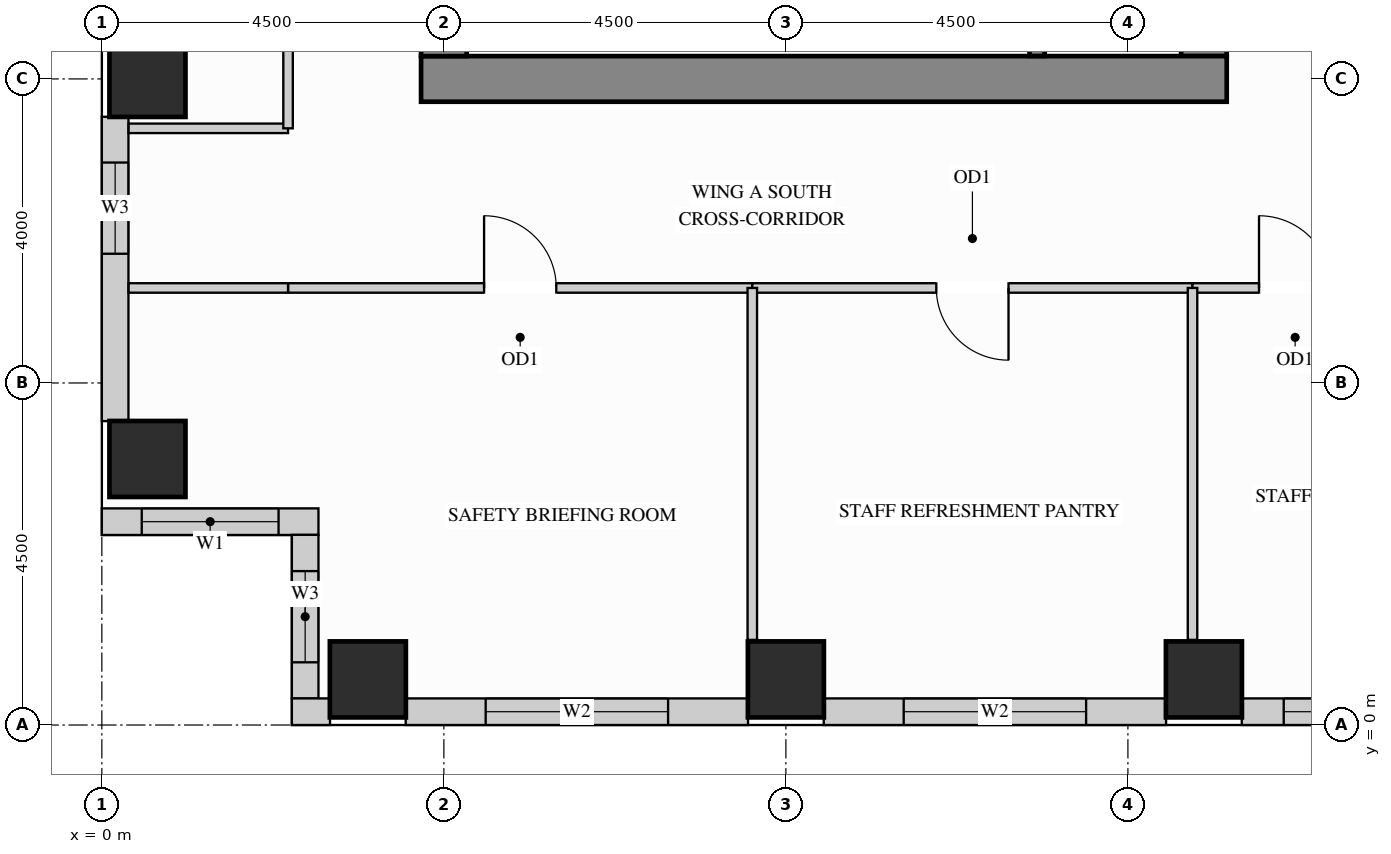
"""IFC4 building model, lengths in metres.
Left out: names, types, materials, properties, quantities, classifications, styles, units other than length and angle.
Written with IfcOpenShell. Run it as: python <this file> out.ifc"""

import sys

from ifc_helpers import new_model, si_unit, direction, frame, frame_2d, origin, origin_2d, place, context, subcontext, project, spatial, rectangle, extrude, source, transform, mapped, element, fill, save


model = new_model("IFC4")
c1 = context("Model", 3, precision=1e-05, world=origin(), true_north=direction((0.0, 1.0)))
c2 = subcontext(c1, "Body", "Model", "MODEL_VIEW")
j1 = project(units=[si_unit("LENGTHUNIT", "METRE"), si_unit("PLANEANGLEUNIT", "RADIAN")], contexts=[c1])
p1 = place(None, origin())
s1 = spatial("IfcSite", under=j1, at=p1, CompositionType="ELEMENT")
p2 = place(p1, origin())
s2 = spatial("IfcBuilding", under=s1, at=p2, CompositionType="ELEMENT")
p3 = place(p2, frame((0.0, 0.0, 182.7)))
s3 = spatial("IfcBuildingStorey", under=s2, at=p3, CompositionType="ELEMENT", Elevation=182.7)
m1 = source(origin(), c2, "Body", "SweptSolid", [
    extrude(rectangle(XDim=1.0, YDim=1.0, at=origin_2d()), origin(), (0.0, 0.0, 1.0), 3.4),
])
for number, where, z_axis, x_axis in (
    (1, (14.5, 0.6, 0.0), (0.0, 0.0, 1.0), (1.0, 0.0, 0.0)),
    (2, (3.5, 0.6, 0.0), (0.0, 0.0, 1.0), (1.0, 0.0, 0.0)),
    (3, (9.0, 0.6, 0.0), (0.0, 0.0, 1.0), (1.0, 0.0, 0.0)),
    (4, (0.6, 3.5, 0.0), (0.0, 0.0, 1.0), (1.0, 0.0, 0.0)),
    (5, (0.6, 8.5, 0.0), (0.0, 0.0, 1.0), (1.0, 0.0, 0.0)),
):
    element("IfcColumn", number, at=place(p3, frame(where, z_axis=z_axis, x_axis=x_axis)), inside=s3, PredefinedType="COLUMN", context=c2, shape_type="MappedRepresentation", body=[
        mapped(m1, transform((0.0, 0.0, 0.0), x_axis=(1.0, 0.0, 0.0), y_axis=(0.0, 1.0, 0.0), z_axis=(0.0, 0.0, 1.0))),
    ])
m2 = source(origin(), c2, "Body", "SweptSolid", [
    extrude(rectangle(XDim=10.02, YDim=0.6, at=frame_2d((5.01, 0.0))), origin(), (0.0, 0.0, 1.0), 3.4),
])
p4 = place(p3, frame((14.5, 8.8, 0.0), z_axis=(0.0, 0.0, 1.0), x_axis=(0.0, 1.0, 0.0)))
e6 = element("IfcWall", 6, at=p4, inside=s3, PredefinedType="SHEAR", context=c2, shape_type="MappedRepresentation", body=[
    mapped(m2, transform((0.0, 0.0, 0.0), x_axis=(1.0, 0.0, 0.0), y_axis=(0.0, 1.0, 0.0), z_axis=(0.0, 0.0, 1.0))),
])
m3 = source(origin(), c2, "Body", "SweptSolid", [
    extrude(rectangle(XDim=10.6, YDim=0.6, at=frame_2d((5.3, 0.0))), origin(), (0.0, 0.0, 1.0), 3.4),
])
p5 = place(p3, frame((4.2, 8.5, 0.0), z_axis=(0.0, 0.0, 1.0), x_axis=(1.0, 0.0, 0.0)))
e7 = element("IfcWall", 7, at=p5, inside=s3, PredefinedType="SHEAR", context=c2, shape_type="MappedRepresentation", body=[
    mapped(m3, transform((0.0, 0.0, 0.0), x_axis=(1.0, 0.0, 0.0), y_axis=(0.0, 1.0, 0.0), z_axis=(0.0, 0.0, 1.0))),
])
m4 = source(origin(), c2, "Body", "SweptSolid", [
    extrude(rectangle(XDim=20.4, YDim=0.6, at=frame_2d((10.2, 0.0))), origin(), (0.0, 0.0, 1.0), 3.4),
])
p6 = place(p3, frame((4.5, 8.8, 0.0), z_axis=(0.0, 0.0, 1.0), x_axis=(0.0, 1.0, 0.0)))
e8 = element("IfcWall", 8, at=p6, inside=s3, PredefinedType="SHEAR", context=c2, shape_type="MappedRepresentation", body=[
    mapped(m4, transform((0.0, 0.0, 0.0), x_axis=(1.0, 0.0, 0.0), y_axis=(0.0, 1.0, 0.0), z_axis=(0.0, 0.0, 1.0))),
])
p7 = place(p3, frame((0.175, 8.002, 0.0), z_axis=(0.0, 0.0, 1.0), x_axis=(0.0, -1.0, 0.0)))
e9 = element("IfcWall", 9, at=p7, inside=s3, PredefinedType="SOLIDWALL", context=c2, shape_type="SweptSolid", body=[
    extrude(rectangle(XDim=4.004, YDim=0.35, at=frame_2d((2.002, 0.0))), origin(), (0.0, 0.0, 1.0), 2.612),
])
p8 = place(p7, frame((0.602, 0.0, 0.78)))
e10 = element("IfcOpeningElement", 10, at=p8, cuts=e9, PredefinedType="OPENING", context=c2, shape_type="SweptSolid", body=[
    extrude(rectangle(XDim=1.2, YDim=1.652, at=frame_2d((0.6, 0.826))), frame((0.0, 0.185, 0.0), z_axis=(0.0, -1.0, 0.0), x_axis=(1.0, 0.0, 0.0)), (0.0, 0.0, 1.0), 0.37),
])
p9 = place(p3, frame((0.0, 2.675, 0.0), z_axis=(0.0, 0.0, 1.0), x_axis=(1.0, 0.0, 0.0)))
e11 = element("IfcWall", 11, at=p9, inside=s3, PredefinedType="SOLIDWALL", context=c2, shape_type="SweptSolid", body=[
    extrude(rectangle(XDim=2.85, YDim=0.35, at=frame_2d((1.425, 0.0))), origin(), (0.0, 0.0, 1.0), 3.385),
])
p10 = place(p9, frame((0.525, 0.0, 0.78)))
e12 = element("IfcOpeningElement", 12, at=p10, cuts=e11, PredefinedType="OPENING", context=c2, shape_type="SweptSolid", body=[
    extrude(rectangle(XDim=1.8, YDim=2.1, at=frame_2d((0.9, 1.05))), frame((0.0, 0.185, 0.0), z_axis=(0.0, -1.0, 0.0), x_axis=(1.0, 0.0, 0.0)), (0.0, 0.0, 1.0), 0.37),
])
p11 = place(p3, frame((2.675, 2.502, 0.0), z_axis=(0.0, 0.0, 1.0), x_axis=(0.0, -1.0, 0.0)))
e13 = element("IfcWall", 13, at=p11, inside=s3, PredefinedType="SOLIDWALL", context=c2, shape_type="SweptSolid", body=[
    extrude(rectangle(XDim=2.154, YDim=0.35, at=frame_2d((1.077, 0.0))), origin(), (0.0, 0.0, 1.0), 3.385),
])
p12 = place(p11, frame((0.477, 0.0, 0.78)))
e14 = element("IfcOpeningElement", 14, at=p12, cuts=e13, PredefinedType="OPENING", context=c2, shape_type="SweptSolid", body=[
    extrude(rectangle(XDim=1.2, YDim=2.1, at=frame_2d((0.6, 1.05))), frame((0.0, 0.185, 0.0), z_axis=(0.0, -1.0, 0.0), x_axis=(1.0, 0.0, 0.0)), (0.0, 0.0, 1.0), 0.37),
])
m5 = source(origin(), c2, "Body", "SweptSolid", [
    extrude(rectangle(XDim=0.502, YDim=0.35, at=frame_2d((0.251, 0.0))), origin(), (0.0, 0.0, 1.0), 3.385),
])
p13 = place(p3, frame((2.5, 0.175, 0.0), z_axis=(0.0, 0.0, 1.0), x_axis=(1.0, 0.0, 0.0)))
e15 = element("IfcWall", 15, at=p13, inside=s3, PredefinedType="SOLIDWALL", context=c2, shape_type="MappedRepresentation", body=[
    mapped(m5, transform((0.0, 0.0, 0.0), x_axis=(1.0, 0.0, 0.0), y_axis=(0.0, 1.0, 0.0), z_axis=(0.0, 0.0, 1.0))),
])
p14 = place(p3, frame((3.998, 0.175, 0.0), z_axis=(0.0, 0.0, 1.0), x_axis=(1.0, 0.0, 0.0)))
e16 = element("IfcWall", 16, at=p14, inside=s3, PredefinedType="SOLIDWALL", context=c2, shape_type="SweptSolid", body=[
    extrude(rectangle(XDim=4.504, YDim=0.35, at=frame_2d((2.252, 0.0))), origin(), (0.0, 0.0, 1.0), 2.612),
])
p15 = place(p14, frame((1.052, 0.0, 0.78)))
e17 = element("IfcOpeningElement", 17, at=p15, cuts=e16, PredefinedType="OPENING", context=c2, shape_type="SweptSolid", body=[
    extrude(rectangle(XDim=2.4, YDim=1.652, at=frame_2d((1.2, 0.826))), frame((0.0, 0.185, 0.0), z_axis=(0.0, -1.0, 0.0), x_axis=(1.0, 0.0, 0.0)), (0.0, 0.0, 1.0), 0.37),
])
p16 = place(p3, frame((9.498, 0.175, 0.0), z_axis=(0.0, 0.0, 1.0), x_axis=(1.0, 0.0, 0.0)))
e18 = element("IfcWall", 18, at=p16, inside=s3, PredefinedType="SOLIDWALL", context=c2, shape_type="SweptSolid", body=[
    extrude(rectangle(XDim=4.504, YDim=0.35, at=frame_2d((2.252, 0.0))), origin(), (0.0, 0.0, 1.0), 2.612),
])
p17 = place(p16, frame((1.052, 0.0, 0.78)))
e19 = element("IfcOpeningElement", 19, at=p17, cuts=e18, PredefinedType="OPENING", context=c2, shape_type="SweptSolid", body=[
    extrude(rectangle(XDim=2.4, YDim=1.652, at=frame_2d((1.2, 0.826))), frame((0.0, 0.185, 0.0), z_axis=(0.0, -1.0, 0.0), x_axis=(1.0, 0.0, 0.0)), (0.0, 0.0, 1.0), 0.37),
])
p18 = place(p3, frame((14.998, 0.175, 0.0), z_axis=(0.0, 0.0, 1.0), x_axis=(1.0, 0.0, 0.0)))
e20 = element("IfcWall", 20, at=p18, inside=s3, PredefinedType="SOLIDWALL", context=c2, shape_type="SweptSolid", body=[
    extrude(rectangle(XDim=3.504, YDim=0.35, at=frame_2d((1.752, 0.0))), origin(), (0.0, 0.0, 1.0), 2.612),
])
p19 = place(p18, frame((0.552, 0.0, 0.78)))
e21 = element("IfcOpeningElement", 21, at=p19, cuts=e20, PredefinedType="OPENING", context=c2, shape_type="SweptSolid", body=[
    extrude(rectangle(XDim=2.4, YDim=1.652, at=frame_2d((1.2, 0.826))), frame((0.0, 0.185, 0.0), z_axis=(0.0, -1.0, 0.0), x_axis=(1.0, 0.0, 0.0)), (0.0, 0.0, 1.0), 0.37),
])
m6 = source(origin(), c2, "Body", "SweptSolid", [
    extrude(rectangle(XDim=2.098, YDim=0.125, at=frame_2d((1.049, 0.0))), origin(), (0.0, 0.0, 1.0), 3.385),
])
p20 = place(p3, frame((0.352, 7.85, 0.0), z_axis=(0.0, 0.0, 1.0), x_axis=(1.0, 0.0, 0.0)))
e22 = element("IfcWall", 22, at=p20, inside=s3, PredefinedType="PARTITIONING", context=c2, shape_type="MappedRepresentation", body=[
    mapped(m6, transform((0.0, 0.0, 0.0), x_axis=(1.0, 0.0, 0.0), y_axis=(0.0, 1.0, 0.0), z_axis=(0.0, 0.0, 1.0))),
])
p21 = place(p3, frame((2.45, 5.75, 0.0), z_axis=(0.0, 0.0, 1.0), x_axis=(1.0, 0.0, 0.0)))
e23 = element("IfcWall", 23, at=p21, inside=s3, PredefinedType="PARTITIONING", context=c2, shape_type="SweptSolid", body=[
    extrude(rectangle(XDim=6.108, YDim=0.125, at=frame_2d((3.054, 0.0))), origin(), (0.0, 0.0, 1.0), 3.385),
])
p22 = place(p21, frame((2.579, 0.0, 0.0)))
e24 = element("IfcOpeningElement", 24, at=p22, cuts=e23, PredefinedType="OPENING", context=c2, shape_type="SweptSolid", body=[
    extrude(rectangle(XDim=0.95, YDim=2.15, at=frame_2d((0.475, 1.075))), frame((0.0, 0.073, 0.0), z_axis=(0.0, -1.0, 0.0), x_axis=(1.0, 0.0, 0.0)), (0.0, 0.0, 1.0), 0.145),
])
p23 = place(p3, frame((8.558, 5.75, 0.0), z_axis=(0.0, 0.0, 1.0), x_axis=(1.0, 0.0, 0.0)))
e25 = element("IfcWall", 25, at=p23, inside=s3, PredefinedType="PARTITIONING", context=c2, shape_type="SweptSolid", body=[
    extrude(rectangle(XDim=5.792, YDim=0.125, at=frame_2d((2.896, 0.0))), origin(), (0.0, 0.0, 1.0), 3.385),
])
p24 = place(p23, frame((2.421, 0.0, 0.0)))
e26 = element("IfcOpeningElement", 26, at=p24, cuts=e25, PredefinedType="OPENING", context=c2, shape_type="SweptSolid", body=[
    extrude(rectangle(XDim=0.95, YDim=2.15, at=frame_2d((0.475, 1.075))), frame((0.0, 0.073, 0.0), z_axis=(0.0, -1.0, 0.0), x_axis=(1.0, 0.0, 0.0)), (0.0, 0.0, 1.0), 0.145),
])
p25 = place(p3, frame((14.35, 5.75, 0.0), z_axis=(0.0, 0.0, 1.0), x_axis=(1.0, 0.0, 0.0)))
e27 = element("IfcWall", 27, at=p25, inside=s3, PredefinedType="PARTITIONING", context=c2, shape_type="SweptSolid", body=[
    extrude(rectangle(XDim=2.7, YDim=0.125, at=frame_2d((1.35, 0.0))), origin(), (0.0, 0.0, 1.0), 3.385),
])
p26 = place(p25, frame((0.875, 0.0, 0.0)))
e28 = element("IfcOpeningElement", 28, at=p26, cuts=e27, PredefinedType="OPENING", context=c2, shape_type="SweptSolid", body=[
    extrude(rectangle(XDim=0.95, YDim=2.15, at=frame_2d((0.475, 1.075))), frame((0.0, 0.073, 0.0), z_axis=(0.0, -1.0, 0.0), x_axis=(1.0, 0.0, 0.0)), (0.0, 0.0, 1.0), 0.145),
])
p27 = place(p3, frame((0.352, 5.75, 0.0), z_axis=(0.0, 0.0, 1.0), x_axis=(1.0, 0.0, 0.0)))
e29 = element("IfcWall", 29, at=p27, inside=s3, PredefinedType="PARTITIONING", context=c2, shape_type="MappedRepresentation", body=[
    mapped(m6, transform((0.0, 0.0, 0.0), x_axis=(1.0, 0.0, 0.0), y_axis=(0.0, 1.0, 0.0), z_axis=(0.0, 0.0, 1.0))),
])
m7 = source(origin(), c2, "Body", "SweptSolid", [
    extrude(rectangle(XDim=4.63, YDim=0.125, at=frame_2d((2.315, 0.0))), origin(), (0.0, 0.0, 1.0), 3.385),
])
for number, where, z_axis, x_axis in (
    (30, (8.558, 1.12, 0.0), (0.0, 0.0, 1.0), (0.0, 1.0, 0.0)),
    (31, (14.35, 1.12, 0.0), (0.0, 0.0, 1.0), (0.0, 1.0, 0.0)),
):
    element("IfcWall", number, at=place(p3, frame(where, z_axis=z_axis, x_axis=x_axis)), inside=s3, PredefinedType="PARTITIONING", context=c2, shape_type="MappedRepresentation", body=[
        mapped(m7, transform((0.0, 0.0, 0.0), x_axis=(1.0, 0.0, 0.0), y_axis=(0.0, 1.0, 0.0), z_axis=(0.0, 0.0, 1.0))),
    ])
p28 = place(p3, frame((2.45, 7.85, 0.0), z_axis=(0.0, 0.0, 1.0), x_axis=(0.0, 1.0, 0.0)))
e32 = element("IfcWall", 32, at=p28, inside=s3, PredefinedType="PARTITIONING", context=c2, shape_type="SweptSolid", body=[
    extrude(rectangle(XDim=7.25, YDim=0.125, at=frame_2d((3.625, 0.0))), origin(), (0.0, 0.0, 1.0), 3.385),
])
p29 = place(p28, frame((3.15, 0.0, 0.0)))
e33 = element("IfcOpeningElement", 33, at=p29, cuts=e32, PredefinedType="OPENING", context=c2, shape_type="SweptSolid", body=[
    extrude(rectangle(XDim=0.95, YDim=2.15, at=frame_2d((0.475, 1.075))), frame((0.0, 0.073, 0.0), z_axis=(0.0, -1.0, 0.0), x_axis=(1.0, 0.0, 0.0)), (0.0, 0.0, 1.0), 0.145),
])
m8 = source(origin(), c2, "Body", "SweptSolid", [
    extrude(rectangle(XDim=3.753, YDim=0.2, at=frame_2d((1.876, 0.0))), origin(), (0.0, 0.0, 1.0), 3.4),
])
p30 = place(p3, frame((12.305, 8.802, 0.0), z_axis=(0.0, 0.0, 1.0), x_axis=(0.0, 1.0, 0.0)))
e34 = element("IfcWall", 34, at=p30, inside=s3, PredefinedType="SHEAR", context=c2, shape_type="MappedRepresentation", body=[
    mapped(m8, transform((0.0, 0.0, 0.0), x_axis=(1.0, 0.0, 0.0), y_axis=(0.0, 1.0, 0.0), z_axis=(0.0, 0.0, 1.0))),
])
m9 = source(origin(), c2, "Body", "SweptSolid", [
    extrude(rectangle(XDim=0.95, YDim=2.15, at=frame_2d((0.475, 1.075))), frame((0.0, 0.025, 0.0), z_axis=(0.0, -1.0, 0.0), x_axis=(1.0, 0.0, 0.0)), (0.0, 0.0, 1.0), 0.05),
])
p31 = place(p22, origin())
e35 = element("IfcDoor", 35, at=p31, inside=s3, OperationType="SINGLE_SWING_LEFT", PredefinedType="DOOR", context=c2, shape_type="MappedRepresentation", body=[
    mapped(m9, transform((0.0, 0.0, 0.0), x_axis=(1.0, 0.0, 0.0), y_axis=(0.0, 1.0, 0.0), z_axis=(0.0, 0.0, 1.0))),
])
fill(e24, e35)
p32 = place(p24, origin())
e36 = element("IfcDoor", 36, at=p32, inside=s3, OperationType="SINGLE_SWING_RIGHT", PredefinedType="DOOR", context=c2, shape_type="MappedRepresentation", body=[
    mapped(m9, transform((0.0, 0.0, 0.0), x_axis=(1.0, 0.0, 0.0), y_axis=(0.0, 1.0, 0.0), z_axis=(0.0, 0.0, 1.0))),
])
fill(e26, e36)
p33 = place(p26, origin())
e37 = element("IfcDoor", 37, at=p33, inside=s3, OperationType="SINGLE_SWING_LEFT", PredefinedType="DOOR", context=c2, shape_type="MappedRepresentation", body=[
    mapped(m9, transform((0.0, 0.0, 0.0), x_axis=(1.0, 0.0, 0.0), y_axis=(0.0, 1.0, 0.0), z_axis=(0.0, 0.0, 1.0))),
])
fill(e28, e37)
m10 = source(origin(), c2, "Body", "SweptSolid", [
    extrude(rectangle(XDim=1.8, YDim=2.1, at=frame_2d((0.9, 1.05))), frame((0.0, 0.03, 0.0), z_axis=(0.0, -1.0, 0.0), x_axis=(1.0, 0.0, 0.0)), (0.0, 0.0, 1.0), 0.06),
])
p34 = place(p10, origin())
e38 = element("IfcWindow", 38, at=p34, inside=s3, PartitioningType="SINGLE_PANEL", PredefinedType="WINDOW", context=c2, shape_type="MappedRepresentation", body=[
    mapped(m10, transform((0.0, 0.0, 0.0), x_axis=(1.0, 0.0, 0.0), y_axis=(0.0, 1.0, 0.0), z_axis=(0.0, 0.0, 1.0))),
])
fill(e12, e38)
m11 = source(origin(), c2, "Body", "SweptSolid", [
    extrude(rectangle(XDim=2.4, YDim=1.652, at=frame_2d((1.2, 0.826))), frame((0.0, 0.03, 0.0), z_axis=(0.0, -1.0, 0.0), x_axis=(1.0, 0.0, 0.0)), (0.0, 0.0, 1.0), 0.06),
])
p35 = place(p15, origin())
e39 = element("IfcWindow", 39, at=p35, inside=s3, PartitioningType="SINGLE_PANEL", PredefinedType="WINDOW", context=c2, shape_type="MappedRepresentation", body=[
    mapped(m11, transform((0.0, 0.0, 0.0), x_axis=(1.0, 0.0, 0.0), y_axis=(0.0, 1.0, 0.0), z_axis=(0.0, 0.0, 1.0))),
])
fill(e17, e39)
p36 = place(p17, origin())
e40 = element("IfcWindow", 40, at=p36, inside=s3, PartitioningType="SINGLE_PANEL", PredefinedType="WINDOW", context=c2, shape_type="MappedRepresentation", body=[
    mapped(m11, transform((0.0, 0.0, 0.0), x_axis=(1.0, 0.0, 0.0), y_axis=(0.0, 1.0, 0.0), z_axis=(0.0, 0.0, 1.0))),
])
fill(e19, e40)
p37 = place(p19, origin())
e41 = element("IfcWindow", 41, at=p37, inside=s3, PartitioningType="SINGLE_PANEL", PredefinedType="WINDOW", context=c2, shape_type="MappedRepresentation", body=[
    mapped(m11, transform((0.0, 0.0, 0.0), x_axis=(1.0, 0.0, 0.0), y_axis=(0.0, 1.0, 0.0), z_axis=(0.0, 0.0, 1.0))),
])
fill(e21, e41)
m12 = source(origin(), c2, "Body", "SweptSolid", [
    extrude(rectangle(XDim=1.2, YDim=1.652, at=frame_2d((0.6, 0.826))), frame((0.0, 0.03, 0.0), z_axis=(0.0, -1.0, 0.0), x_axis=(1.0, 0.0, 0.0)), (0.0, 0.0, 1.0), 0.06),
])
p38 = place(p8, origin())
e42 = element("IfcWindow", 42, at=p38, inside=s3, PartitioningType="SINGLE_PANEL", PredefinedType="WINDOW", context=c2, shape_type="MappedRepresentation", body=[
    mapped(m12, transform((0.0, 0.0, 0.0), x_axis=(1.0, 0.0, 0.0), y_axis=(0.0, 1.0, 0.0), z_axis=(0.0, 0.0, 1.0))),
])
fill(e10, e42)
m13 = source(origin(), c2, "Body", "SweptSolid", [
    extrude(rectangle(XDim=1.2, YDim=2.1, at=frame_2d((0.6, 1.05))), frame((0.0, 0.03, 0.0), z_axis=(0.0, -1.0, 0.0), x_axis=(1.0, 0.0, 0.0)), (0.0, 0.0, 1.0), 0.06),
])
p39 = place(p12, origin())
e43 = element("IfcWindow", 43, at=p39, inside=s3, PartitioningType="SINGLE_PANEL", PredefinedType="WINDOW", context=c2, shape_type="MappedRepresentation", body=[
    mapped(m13, transform((0.0, 0.0, 0.0), x_axis=(1.0, 0.0, 0.0), y_axis=(0.0, 1.0, 0.0), z_axis=(0.0, 0.0, 1.0))),
])
fill(e14, e43)
save(model, sys.argv[1])
